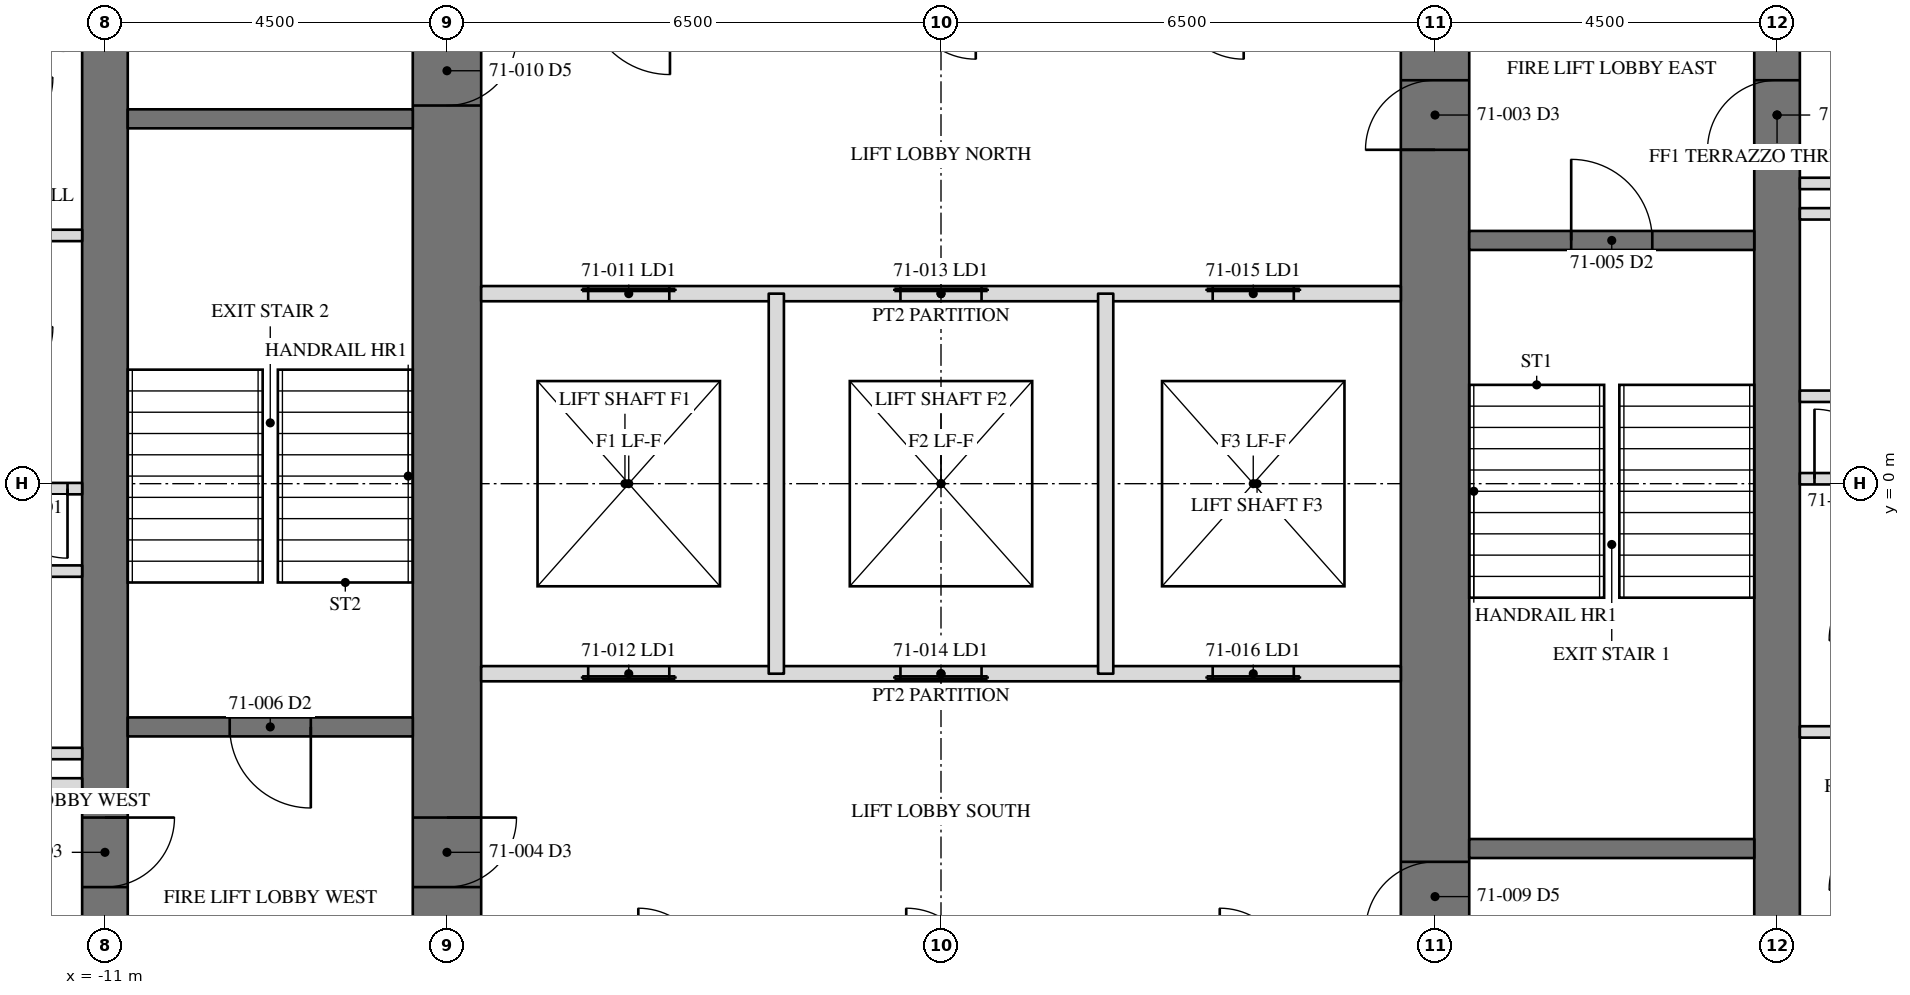
"""IFC4 building model, lengths in metres.
Left out: names, types, materials, properties, quantities, classifications, styles, units other than length and angle.
Written with IfcOpenShell. Run it as: python <this file> out.ifc"""

import sys

from ifc_helpers import new_model, si_unit, direction, frame, frame_2d, origin, place, context, subcontext, project, spatial, rectangle, extrude, element, fill, save


model = new_model("IFC4")
c1 = context("Model", 3, precision=1e-05, world=origin(), true_north=direction((0.0, 1.0)))
c2 = subcontext(c1, "Body", "Model", "MODEL_VIEW")
j1 = project(units=[si_unit("LENGTHUNIT", "METRE"), si_unit("PLANEANGLEUNIT", "RADIAN")], contexts=[c1])
p1 = place(None, origin())
s1 = spatial("IfcSite", under=j1, at=p1, CompositionType="ELEMENT")
p2 = place(p1, origin())
s2 = spatial("IfcBuilding", under=s1, at=p2, CompositionType="ELEMENT")
p3 = place(p2, frame((0.0, 0.0, 288.4)))
s3 = spatial("IfcBuildingStorey", under=s2, at=p3, CompositionType="ELEMENT", Elevation=288.4)
p4 = place(p3, frame((11.0, -11.0, 0.0), z_axis=(0.0, 0.0, 1.0), x_axis=(0.0, 1.0, 0.0)))
e1 = element("IfcWall", 1, at=p4, inside=s3, PredefinedType="SHEAR", context=c2, shape_type="SweptSolid", body=[
    extrude(rectangle(XDim=22.0, YDim=0.6, at=frame_2d((11.0, 0.0))), origin(), (0.0, 0.0, 1.0), 3.6),
])
p5 = place(p4, frame((15.393, 0.0, 0.0)))
e2 = element("IfcOpeningElement", 2, at=p5, cuts=e1, PredefinedType="OPENING", context=c2, shape_type="SweptSolid", body=[
    extrude(rectangle(XDim=0.915, YDim=2.134, at=frame_2d((0.458, 1.067))), frame((0.0, 0.31, 0.0), z_axis=(0.0, -1.0, 0.0), x_axis=(1.0, 0.0, 0.0)), (0.0, 0.0, 1.0), 0.62),
])
p6 = place(p3, frame((-11.0, 11.0, 0.0), z_axis=(0.0, 0.0, 1.0), x_axis=(0.0, -1.0, 0.0)))
e3 = element("IfcWall", 3, at=p6, inside=s3, PredefinedType="SHEAR", context=c2, shape_type="SweptSolid", body=[
    extrude(rectangle(XDim=22.0, YDim=0.6, at=frame_2d((11.0, 0.0))), origin(), (0.0, 0.0, 1.0), 3.6),
])
p7 = place(p6, frame((15.393, 0.0, 0.0)))
e4 = element("IfcOpeningElement", 4, at=p7, cuts=e3, PredefinedType="OPENING", context=c2, shape_type="SweptSolid", body=[
    extrude(rectangle(XDim=0.915, YDim=2.134, at=frame_2d((0.458, 1.067))), frame((0.0, 0.31, 0.0), z_axis=(0.0, -1.0, 0.0), x_axis=(1.0, 0.0, 0.0)), (0.0, 0.0, 1.0), 0.62),
])
p8 = place(p3, frame((6.5, -6.5, 0.0), z_axis=(0.0, 0.0, 1.0), x_axis=(0.0, 1.0, 0.0)))
e5 = element("IfcWall", 5, at=p8, inside=s3, PredefinedType="SHEAR", context=c2, shape_type="SweptSolid", body=[
    extrude(rectangle(XDim=13.0, YDim=0.9, at=frame_2d((6.5, 0.0))), origin(), (0.0, 0.0, 1.0), 3.6),
])
p9 = place(p8, frame((10.893, 0.0, 0.0)))
e6 = element("IfcOpeningElement", 6, at=p9, cuts=e5, PredefinedType="OPENING", context=c2, shape_type="SweptSolid", body=[
    extrude(rectangle(XDim=0.915, YDim=2.134, at=frame_2d((0.458, 1.067))), frame((0.0, 0.46, 0.0), z_axis=(0.0, -1.0, 0.0), x_axis=(1.0, 0.0, 0.0)), (0.0, 0.0, 1.0), 0.92),
])
p10 = place(p8, frame((0.61, 0.0, 0.0)))
e7 = element("IfcOpeningElement", 7, at=p10, cuts=e5, PredefinedType="OPENING", context=c2, shape_type="SweptSolid", body=[
    extrude(rectangle(XDim=0.915, YDim=2.134, at=frame_2d((0.458, 1.067))), frame((0.0, 0.46, 0.0), z_axis=(0.0, -1.0, 0.0), x_axis=(1.0, 0.0, 0.0)), (0.0, 0.0, 1.0), 0.92),
])
p11 = place(p3, frame((-6.5, 6.5, 0.0), z_axis=(0.0, 0.0, 1.0), x_axis=(0.0, -1.0, 0.0)))
e8 = element("IfcWall", 8, at=p11, inside=s3, PredefinedType="SHEAR", context=c2, shape_type="SweptSolid", body=[
    extrude(rectangle(XDim=13.0, YDim=0.9, at=frame_2d((6.5, 0.0))), origin(), (0.0, 0.0, 1.0), 3.6),
])
p12 = place(p11, frame((10.893, 0.0, 0.0)))
e9 = element("IfcOpeningElement", 9, at=p12, cuts=e8, PredefinedType="OPENING", context=c2, shape_type="SweptSolid", body=[
    extrude(rectangle(XDim=0.915, YDim=2.134, at=frame_2d((0.458, 1.067))), frame((0.0, 0.46, 0.0), z_axis=(0.0, -1.0, 0.0), x_axis=(1.0, 0.0, 0.0)), (0.0, 0.0, 1.0), 0.92),
])
p13 = place(p11, frame((0.61, 0.0, 0.0)))
e10 = element("IfcOpeningElement", 10, at=p13, cuts=e8, PredefinedType="OPENING", context=c2, shape_type="SweptSolid", body=[
    extrude(rectangle(XDim=0.915, YDim=2.134, at=frame_2d((0.458, 1.067))), frame((0.0, 0.46, 0.0), z_axis=(0.0, -1.0, 0.0), x_axis=(1.0, 0.0, 0.0)), (0.0, 0.0, 1.0), 0.92),
])
for number, where, z_axis, x_axis in (
    (11, (6.95, -4.8, 0.0), (0.0, 0.0, 1.0), (1.0, 0.0, 0.0)),
    (12, (-6.95, 4.8, 0.0), (0.0, 0.0, 1.0), (-1.0, 0.0, 0.0)),
):
    element("IfcWall", number, at=place(p3, frame(where, z_axis=z_axis, x_axis=x_axis)), inside=s3, PredefinedType="SOLIDWALL", context=c2, shape_type="SweptSolid", body=[
        extrude(rectangle(XDim=3.75, YDim=0.25, at=frame_2d((1.875, 0.0))), origin(), (0.0, 0.0, 1.0), 3.41),
    ])
p14 = place(p3, frame((6.95, 3.2, 0.0), z_axis=(0.0, 0.0, 1.0), x_axis=(1.0, 0.0, 0.0)))
e13 = element("IfcWall", 13, at=p14, inside=s3, PredefinedType="SOLIDWALL", context=c2, shape_type="SweptSolid", body=[
    extrude(rectangle(XDim=3.75, YDim=0.25, at=frame_2d((1.875, 0.0))), origin(), (0.0, 0.0, 1.0), 3.41),
])
p15 = place(p14, frame((1.342, 0.0, 0.0)))
e14 = element("IfcOpeningElement", 14, at=p15, cuts=e13, PredefinedType="OPENING", context=c2, shape_type="SweptSolid", body=[
    extrude(rectangle(XDim=1.067, YDim=2.134, at=frame_2d((0.533, 1.067))), frame((0.0, 0.135, 0.0), z_axis=(0.0, -1.0, 0.0), x_axis=(1.0, 0.0, 0.0)), (0.0, 0.0, 1.0), 0.27),
])
p16 = place(p3, frame((-6.95, -3.2, 0.0), z_axis=(0.0, 0.0, 1.0), x_axis=(-1.0, 0.0, 0.0)))
e15 = element("IfcWall", 15, at=p16, inside=s3, PredefinedType="SOLIDWALL", context=c2, shape_type="SweptSolid", body=[
    extrude(rectangle(XDim=3.75, YDim=0.25, at=frame_2d((1.875, 0.0))), origin(), (0.0, 0.0, 1.0), 3.41),
])
p17 = place(p16, frame((1.342, 0.0, 0.0)))
e16 = element("IfcOpeningElement", 16, at=p17, cuts=e15, PredefinedType="OPENING", context=c2, shape_type="SweptSolid", body=[
    extrude(rectangle(XDim=1.067, YDim=2.134, at=frame_2d((0.533, 1.067))), frame((0.0, 0.135, 0.0), z_axis=(0.0, -1.0, 0.0), x_axis=(1.0, 0.0, 0.0)), (0.0, 0.0, 1.0), 0.27),
])
p18 = place(p3, frame((-6.05, 2.5, 0.0), z_axis=(0.0, 0.0, 1.0), x_axis=(1.0, 0.0, 0.0)))
e17 = element("IfcWall", 17, at=p18, inside=s3, PredefinedType="PARTITIONING", context=c2, shape_type="SweptSolid", body=[
    extrude(rectangle(XDim=12.1, YDim=0.2, at=frame_2d((6.05, 0.0))), origin(), (0.0, 0.0, 1.0), 3.41),
])
p19 = place(p18, frame((1.408, 0.0, 0.0)))
e18 = element("IfcOpeningElement", 18, at=p19, cuts=e17, PredefinedType="OPENING", context=c2, shape_type="SweptSolid", body=[
    extrude(rectangle(XDim=1.067, YDim=2.134, at=frame_2d((0.533, 1.067))), frame((0.0, 0.11, 0.0), z_axis=(0.0, -1.0, 0.0), x_axis=(1.0, 0.0, 0.0)), (0.0, 0.0, 1.0), 0.22),
])
p20 = place(p18, frame((5.517, 0.0, 0.0)))
e19 = element("IfcOpeningElement", 19, at=p20, cuts=e17, PredefinedType="OPENING", context=c2, shape_type="SweptSolid", body=[
    extrude(rectangle(XDim=1.067, YDim=2.134, at=frame_2d((0.533, 1.067))), frame((0.0, 0.11, 0.0), z_axis=(0.0, -1.0, 0.0), x_axis=(1.0, 0.0, 0.0)), (0.0, 0.0, 1.0), 0.22),
])
p21 = place(p18, frame((9.625, 0.0, 0.0)))
e20 = element("IfcOpeningElement", 20, at=p21, cuts=e17, PredefinedType="OPENING", context=c2, shape_type="SweptSolid", body=[
    extrude(rectangle(XDim=1.067, YDim=2.134, at=frame_2d((0.533, 1.067))), frame((0.0, 0.11, 0.0), z_axis=(0.0, -1.0, 0.0), x_axis=(1.0, 0.0, 0.0)), (0.0, 0.0, 1.0), 0.22),
])
p22 = place(p3, frame((6.05, -2.5, 0.0), z_axis=(0.0, 0.0, 1.0), x_axis=(-1.0, 0.0, 0.0)))
e21 = element("IfcWall", 21, at=p22, inside=s3, PredefinedType="PARTITIONING", context=c2, shape_type="SweptSolid", body=[
    extrude(rectangle(XDim=12.1, YDim=0.2, at=frame_2d((6.05, 0.0))), origin(), (0.0, 0.0, 1.0), 3.41),
])
p23 = place(p22, frame((9.625, 0.0, 0.0)))
e22 = element("IfcOpeningElement", 22, at=p23, cuts=e21, PredefinedType="OPENING", context=c2, shape_type="SweptSolid", body=[
    extrude(rectangle(XDim=1.067, YDim=2.134, at=frame_2d((0.533, 1.067))), frame((0.0, 0.11, 0.0), z_axis=(0.0, -1.0, 0.0), x_axis=(1.0, 0.0, 0.0)), (0.0, 0.0, 1.0), 0.22),
])
p24 = place(p22, frame((5.517, 0.0, 0.0)))
e23 = element("IfcOpeningElement", 23, at=p24, cuts=e21, PredefinedType="OPENING", context=c2, shape_type="SweptSolid", body=[
    extrude(rectangle(XDim=1.067, YDim=2.134, at=frame_2d((0.533, 1.067))), frame((0.0, 0.11, 0.0), z_axis=(0.0, -1.0, 0.0), x_axis=(1.0, 0.0, 0.0)), (0.0, 0.0, 1.0), 0.22),
])
p25 = place(p22, frame((1.408, 0.0, 0.0)))
e24 = element("IfcOpeningElement", 24, at=p25, cuts=e21, PredefinedType="OPENING", context=c2, shape_type="SweptSolid", body=[
    extrude(rectangle(XDim=1.067, YDim=2.134, at=frame_2d((0.533, 1.067))), frame((0.0, 0.11, 0.0), z_axis=(0.0, -1.0, 0.0), x_axis=(1.0, 0.0, 0.0)), (0.0, 0.0, 1.0), 0.22),
])
for number, where, z_axis, x_axis in (
    (25, (-2.167, -2.5, 0.0), (0.0, 0.0, 1.0), (0.0, 1.0, 0.0)),
    (26, (2.167, -2.5, 0.0), (0.0, 0.0, 1.0), (0.0, 1.0, 0.0)),
):
    element("IfcWall", number, at=place(p3, frame(where, z_axis=z_axis, x_axis=x_axis)), inside=s3, PredefinedType="PARTITIONING", context=c2, shape_type="SweptSolid", body=[
        extrude(rectangle(XDim=5.0, YDim=0.2, at=frame_2d((2.5, 0.0))), origin(), (0.0, 0.0, 1.0), 3.41),
    ])
p26 = place(p3, frame((11.3, -3.266, 0.0), z_axis=(0.0, 0.0, 1.0), x_axis=(1.0, 0.0, 0.0)))
e27 = element("IfcWall", 27, at=p26, inside=s3, PredefinedType="PARTITIONING", context=c2, shape_type="SweptSolid", body=[
    extrude(rectangle(XDim=5.615, YDim=0.15, at=frame_2d((2.808, 0.0))), origin(), (0.0, 0.0, 1.0), 2.709),
])
p27 = place(p3, frame((11.3, 0.065, 0.0), z_axis=(0.0, 0.0, 1.0), x_axis=(1.0, 0.0, 0.0)))
e28 = element("IfcWall", 28, at=p27, inside=s3, PredefinedType="PARTITIONING", context=c2, shape_type="SweptSolid", body=[
    extrude(rectangle(XDim=5.615, YDim=0.15, at=frame_2d((2.808, 0.0))), origin(), (0.0, 0.0, 1.0), 2.709),
])
p28 = place(p27, frame((0.192, 0.0, 0.0)))
e29 = element("IfcOpeningElement", 29, at=p28, cuts=e28, PredefinedType="OPENING", context=c2, shape_type="SweptSolid", body=[
    extrude(rectangle(XDim=0.915, YDim=2.134, at=frame_2d((0.458, 1.067))), frame((0.0, 0.085, 0.0), z_axis=(0.0, -1.0, 0.0), x_axis=(1.0, 0.0, 0.0)), (0.0, 0.0, 1.0), 0.17),
])
p29 = place(p3, frame((11.3, 3.95, 0.0), z_axis=(0.0, 0.0, 1.0), x_axis=(1.0, 0.0, 0.0)))
e30 = element("IfcWall", 30, at=p29, inside=s3, PredefinedType="PARTITIONING", context=c2, shape_type="SweptSolid", body=[
    extrude(rectangle(XDim=1.525, YDim=0.15, at=frame_2d((0.762, 0.0))), origin(), (0.0, 0.0, 1.0), 3.41),
])
for number, where, z_axis, x_axis in (
    (31, (11.3, 1.15, 0.0), (0.0, 0.0, 1.0), (1.0, 0.0, 0.0)),
    (32, (11.3, 3.55, 0.0), (0.0, 0.0, 1.0), (1.0, 0.0, 0.0)),
):
    element("IfcWall", number, at=place(p3, frame(where, z_axis=z_axis, x_axis=x_axis)), inside=s3, PredefinedType="PARTITIONING", context=c2, shape_type="SweptSolid", body=[
        extrude(rectangle(XDim=2.725, YDim=0.15, at=frame_2d((1.362, 0.0))), origin(), (0.0, 0.0, 1.0), 3.41),
    ])
p30 = place(p3, frame((-11.3, 3.266, 0.0), z_axis=(0.0, 0.0, 1.0), x_axis=(-1.0, 0.0, 0.0)))
e33 = element("IfcWall", 33, at=p30, inside=s3, PredefinedType="PARTITIONING", context=c2, shape_type="SweptSolid", body=[
    extrude(rectangle(XDim=5.615, YDim=0.15, at=frame_2d((2.808, 0.0))), origin(), (0.0, 0.0, 1.0), 2.709),
])
p31 = place(p3, frame((-11.3, -0.065, 0.0), z_axis=(0.0, 0.0, 1.0), x_axis=(-1.0, 0.0, 0.0)))
e34 = element("IfcWall", 34, at=p31, inside=s3, PredefinedType="PARTITIONING", context=c2, shape_type="SweptSolid", body=[
    extrude(rectangle(XDim=5.615, YDim=0.15, at=frame_2d((2.808, 0.0))), origin(), (0.0, 0.0, 1.0), 2.709),
])
p32 = place(p31, frame((0.192, 0.0, 0.0)))
e35 = element("IfcOpeningElement", 35, at=p32, cuts=e34, PredefinedType="OPENING", context=c2, shape_type="SweptSolid", body=[
    extrude(rectangle(XDim=0.915, YDim=2.134, at=frame_2d((0.458, 1.067))), frame((0.0, 0.085, 0.0), z_axis=(0.0, -1.0, 0.0), x_axis=(1.0, 0.0, 0.0)), (0.0, 0.0, 1.0), 0.17),
])
p33 = place(p3, frame((-11.3, -3.95, 0.0), z_axis=(0.0, 0.0, 1.0), x_axis=(-1.0, 0.0, 0.0)))
e36 = element("IfcWall", 36, at=p33, inside=s3, PredefinedType="PARTITIONING", context=c2, shape_type="SweptSolid", body=[
    extrude(rectangle(XDim=1.525, YDim=0.15, at=frame_2d((0.762, 0.0))), origin(), (0.0, 0.0, 1.0), 3.41),
])
for number, where, z_axis, x_axis in (
    (37, (-11.3, -1.15, 0.0), (0.0, 0.0, 1.0), (-1.0, 0.0, 0.0)),
    (38, (-11.3, -3.55, 0.0), (0.0, 0.0, 1.0), (-1.0, 0.0, 0.0)),
):
    element("IfcWall", number, at=place(p3, frame(where, z_axis=z_axis, x_axis=x_axis)), inside=s3, PredefinedType="PARTITIONING", context=c2, shape_type="SweptSolid", body=[
        extrude(rectangle(XDim=2.725, YDim=0.15, at=frame_2d((1.362, 0.0))), origin(), (0.0, 0.0, 1.0), 3.41),
    ])
p34 = place(p5, origin())
e39 = element("IfcDoor", 39, at=p34, inside=s3, OperationType="SINGLE_SWING_RIGHT", PredefinedType="DOOR", context=c2, shape_type="SweptSolid", body=[
    extrude(rectangle(XDim=0.915, YDim=2.134, at=frame_2d((0.458, 1.067))), frame((0.0, -0.225, 0.0), z_axis=(0.0, -1.0, 0.0), x_axis=(1.0, 0.0, 0.0)), (0.0, 0.0, 1.0), 0.05),
])
fill(e2, e39)
p35 = place(p7, origin())
e40 = element("IfcDoor", 40, at=p35, inside=s3, OperationType="SINGLE_SWING_RIGHT", PredefinedType="DOOR", context=c2, shape_type="SweptSolid", body=[
    extrude(rectangle(XDim=0.915, YDim=2.134, at=frame_2d((0.458, 1.067))), frame((0.0, -0.225, 0.0), z_axis=(0.0, -1.0, 0.0), x_axis=(1.0, 0.0, 0.0)), (0.0, 0.0, 1.0), 0.05),
])
fill(e4, e40)
p36 = place(p9, origin())
e41 = element("IfcDoor", 41, at=p36, inside=s3, OperationType="SINGLE_SWING_RIGHT", PredefinedType="DOOR", context=c2, shape_type="SweptSolid", body=[
    extrude(rectangle(XDim=0.915, YDim=2.134, at=frame_2d((0.458, 1.067))), frame((0.0, -0.375, 0.0), z_axis=(0.0, -1.0, 0.0), x_axis=(1.0, 0.0, 0.0)), (0.0, 0.0, 1.0), 0.05),
])
fill(e6, e41)
p37 = place(p12, origin())
e42 = element("IfcDoor", 42, at=p37, inside=s3, OperationType="SINGLE_SWING_RIGHT", PredefinedType="DOOR", context=c2, shape_type="SweptSolid", body=[
    extrude(rectangle(XDim=0.915, YDim=2.134, at=frame_2d((0.458, 1.067))), frame((0.0, -0.375, 0.0), z_axis=(0.0, -1.0, 0.0), x_axis=(1.0, 0.0, 0.0)), (0.0, 0.0, 1.0), 0.05),
])
fill(e9, e42)
p38 = place(p15, origin())
e43 = element("IfcDoor", 43, at=p38, inside=s3, OperationType="SINGLE_SWING_LEFT", PredefinedType="DOOR", context=c2, shape_type="SweptSolid", body=[
    extrude(rectangle(XDim=1.067, YDim=2.134, at=frame_2d((0.533, 1.067))), frame((0.0, 0.025, 0.0), z_axis=(0.0, -1.0, 0.0), x_axis=(1.0, 0.0, 0.0)), (0.0, 0.0, 1.0), 0.05),
])
fill(e14, e43)
p39 = place(p17, origin())
e44 = element("IfcDoor", 44, at=p39, inside=s3, OperationType="SINGLE_SWING_LEFT", PredefinedType="DOOR", context=c2, shape_type="SweptSolid", body=[
    extrude(rectangle(XDim=1.067, YDim=2.134, at=frame_2d((0.533, 1.067))), frame((0.0, 0.025, 0.0), z_axis=(0.0, -1.0, 0.0), x_axis=(1.0, 0.0, 0.0)), (0.0, 0.0, 1.0), 0.05),
])
fill(e16, e44)
p40 = place(p10, origin())
e45 = element("IfcDoor", 45, at=p40, inside=s3, OperationType="SINGLE_SWING_RIGHT", PredefinedType="DOOR", context=c2, shape_type="SweptSolid", body=[
    extrude(rectangle(XDim=0.915, YDim=2.134, at=frame_2d((0.458, 1.067))), frame((0.0, -0.375, 0.0), z_axis=(0.0, -1.0, 0.0), x_axis=(1.0, 0.0, 0.0)), (0.0, 0.0, 1.0), 0.05),
])
fill(e7, e45)
p41 = place(p13, origin())
e46 = element("IfcDoor", 46, at=p41, inside=s3, OperationType="SINGLE_SWING_RIGHT", PredefinedType="DOOR", context=c2, shape_type="SweptSolid", body=[
    extrude(rectangle(XDim=0.915, YDim=2.134, at=frame_2d((0.458, 1.067))), frame((0.0, -0.375, 0.0), z_axis=(0.0, -1.0, 0.0), x_axis=(1.0, 0.0, 0.0)), (0.0, 0.0, 1.0), 0.05),
])
fill(e10, e46)
p42 = place(p19, origin())
e47 = element("IfcDoor", 47, at=p42, inside=s3, OperationType="SLIDING_TO_LEFT", PredefinedType="DOOR", context=c2, shape_type="SweptSolid", body=[
    extrude(rectangle(XDim=1.067, YDim=2.134, at=frame_2d((0.533, 1.067))), frame((0.0, 0.025, 0.0), z_axis=(0.0, -1.0, 0.0), x_axis=(1.0, 0.0, 0.0)), (0.0, 0.0, 1.0), 0.05),
])
fill(e18, e47)
p43 = place(p23, origin())
e48 = element("IfcDoor", 48, at=p43, inside=s3, OperationType="SLIDING_TO_LEFT", PredefinedType="DOOR", context=c2, shape_type="SweptSolid", body=[
    extrude(rectangle(XDim=1.067, YDim=2.134, at=frame_2d((0.533, 1.067))), frame((0.0, 0.025, 0.0), z_axis=(0.0, -1.0, 0.0), x_axis=(1.0, 0.0, 0.0)), (0.0, 0.0, 1.0), 0.05),
])
fill(e22, e48)
p44 = place(p20, origin())
e49 = element("IfcDoor", 49, at=p44, inside=s3, OperationType="SLIDING_TO_LEFT", PredefinedType="DOOR", context=c2, shape_type="SweptSolid", body=[
    extrude(rectangle(XDim=1.067, YDim=2.134, at=frame_2d((0.533, 1.067))), frame((0.0, 0.025, 0.0), z_axis=(0.0, -1.0, 0.0), x_axis=(1.0, 0.0, 0.0)), (0.0, 0.0, 1.0), 0.05),
])
fill(e19, e49)
p45 = place(p24, origin())
e50 = element("IfcDoor", 50, at=p45, inside=s3, OperationType="SLIDING_TO_LEFT", PredefinedType="DOOR", context=c2, shape_type="SweptSolid", body=[
    extrude(rectangle(XDim=1.067, YDim=2.134, at=frame_2d((0.533, 1.067))), frame((0.0, 0.025, 0.0), z_axis=(0.0, -1.0, 0.0), x_axis=(1.0, 0.0, 0.0)), (0.0, 0.0, 1.0), 0.05),
])
fill(e23, e50)
p46 = place(p21, origin())
e51 = element("IfcDoor", 51, at=p46, inside=s3, OperationType="SLIDING_TO_LEFT", PredefinedType="DOOR", context=c2, shape_type="SweptSolid", body=[
    extrude(rectangle(XDim=1.067, YDim=2.134, at=frame_2d((0.533, 1.067))), frame((0.0, 0.025, 0.0), z_axis=(0.0, -1.0, 0.0), x_axis=(1.0, 0.0, 0.0)), (0.0, 0.0, 1.0), 0.05),
])
fill(e20, e51)
p47 = place(p25, origin())
e52 = element("IfcDoor", 52, at=p47, inside=s3, OperationType="SLIDING_TO_LEFT", PredefinedType="DOOR", context=c2, shape_type="SweptSolid", body=[
    extrude(rectangle(XDim=1.067, YDim=2.134, at=frame_2d((0.533, 1.067))), frame((0.0, 0.025, 0.0), z_axis=(0.0, -1.0, 0.0), x_axis=(1.0, 0.0, 0.0)), (0.0, 0.0, 1.0), 0.05),
])
fill(e24, e52)
p48 = place(p28, origin())
e53 = element("IfcDoor", 53, at=p48, inside=s3, OperationType="SINGLE_SWING_LEFT", PredefinedType="DOOR", context=c2, shape_type="SweptSolid", body=[
    extrude(rectangle(XDim=0.915, YDim=2.134, at=frame_2d((0.458, 1.067))), frame((0.0, 0.025, 0.0), z_axis=(0.0, -1.0, 0.0), x_axis=(1.0, 0.0, 0.0)), (0.0, 0.0, 1.0), 0.05),
])
fill(e29, e53)
p49 = place(p32, origin())
e54 = element("IfcDoor", 54, at=p49, inside=s3, OperationType="SINGLE_SWING_LEFT", PredefinedType="DOOR", context=c2, shape_type="SweptSolid", body=[
    extrude(rectangle(XDim=0.915, YDim=2.134, at=frame_2d((0.458, 1.067))), frame((0.0, 0.025, 0.0), z_axis=(0.0, -1.0, 0.0), x_axis=(1.0, 0.0, 0.0)), (0.0, 0.0, 1.0), 0.05),
])
fill(e35, e54)
save(model, sys.argv[1])
